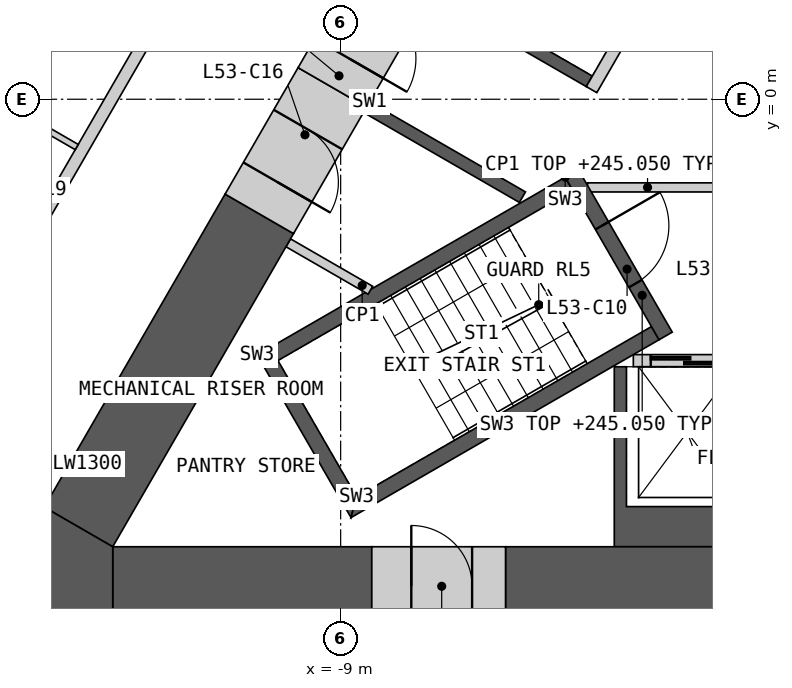
"""IFC4 building model, lengths in metres.
Left out: names, types, materials, properties, quantities, classifications, styles, units other than length and angle.
Written with IfcOpenShell. Run it as: python <this file> out.ifc"""

import sys

from ifc_helpers import new_model, si_unit, direction, frame, frame_2d, origin, place, context, subcontext, project, spatial, polyline, rectangle, outline, extrude, element, fill, save


model = new_model("IFC4")
c1 = context("Model", 3, precision=1e-05, world=origin(), true_north=direction((0.0, 1.0)))
c2 = subcontext(c1, "Body", "Model", "MODEL_VIEW")
j1 = project(units=[si_unit("LENGTHUNIT", "METRE"), si_unit("PLANEANGLEUNIT", "RADIAN")], contexts=[c1])
p1 = place(None, origin())
s1 = spatial("IfcSite", under=j1, at=p1, CompositionType="ELEMENT")
p2 = place(p1, origin())
s2 = spatial("IfcBuilding", under=s1, at=p2, CompositionType="ELEMENT")
p3 = place(p2, frame((0.0, 0.0, 241.8)))
s3 = spatial("IfcBuildingStorey", under=s2, at=p3, CompositionType="ELEMENT", Elevation=241.8)
p4 = place(p3, origin())
e1 = element("IfcWall", 1, at=p4, inside=s3, PredefinedType="SHEAR", context=c2, shape_type="SweptSolid", body=[
    extrude(outline(polyline([(0.1, -7.36), (-4.5, -7.36), (-4.5, -4.4), (-4.3, -4.4), (-4.3, -6.7), (-2.3, -6.7), (-2.3, -4.4), (-2.1, -4.4), (-2.1, -6.7), (-0.1, -6.7), (-0.1, -4.4), (0.1, -4.4), (0.1, -7.36)])), origin(), (0.0, 0.0, 1.0), 3.25),
])
p5 = place(p3, frame((-4.187, -4.3, 0.0), z_axis=(0.0, 0.0, 1.0), x_axis=(1.0, 0.0, 0.0)))
e2 = element("IfcWall", 2, at=p5, inside=s3, PredefinedType="SOLIDWALL", context=c2, shape_type="SweptSolid", body=[
    extrude(rectangle(XDim=8.373, YDim=0.2, at=frame_2d((4.187, 0.0))), origin(), (0.0, 0.0, 1.0), 3.25),
])
p6 = place(p5, frame((0.287, 0.0, 0.0)))
e3 = element("IfcOpeningElement", 3, at=p6, cuts=e2, PredefinedType="OPENING", context=c2, shape_type="SweptSolid", body=[
    extrude(rectangle(XDim=1.2, YDim=2.1, at=frame_2d((0.6, 1.05))), frame((0.0, 0.11, 0.0), z_axis=(0.0, -1.0, 0.0), x_axis=(1.0, 0.0, 0.0)), (0.0, 0.0, 1.0), 0.22),
])
p7 = place(p5, frame((2.387, 0.0, 0.0)))
e4 = element("IfcOpeningElement", 4, at=p7, cuts=e2, PredefinedType="OPENING", context=c2, shape_type="SweptSolid", body=[
    extrude(rectangle(XDim=1.4, YDim=2.1, at=frame_2d((0.7, 1.05))), frame((0.0, 0.11, 0.0), z_axis=(0.0, -1.0, 0.0), x_axis=(1.0, 0.0, 0.0)), (0.0, 0.0, 1.0), 0.22),
])
p8 = place(p5, frame((4.837, 0.0, 0.0)))
e5 = element("IfcOpeningElement", 5, at=p8, cuts=e2, PredefinedType="OPENING", context=c2, shape_type="SweptSolid", body=[
    extrude(rectangle(XDim=0.9, YDim=2.1, at=frame_2d((0.45, 1.05))), frame((0.0, 0.11, 0.0), z_axis=(0.0, -1.0, 0.0), x_axis=(1.0, 0.0, 0.0)), (0.0, 0.0, 1.0), 0.22),
])
p9 = place(p5, frame((6.887, 0.0, 0.0)))
e6 = element("IfcOpeningElement", 6, at=p9, cuts=e2, PredefinedType="OPENING", context=c2, shape_type="SweptSolid", body=[
    extrude(rectangle(XDim=1.2, YDim=2.1, at=frame_2d((0.6, 1.05))), frame((0.0, 0.11, 0.0), z_axis=(0.0, -1.0, 0.0), x_axis=(1.0, 0.0, 0.0)), (0.0, 0.0, 1.0), 0.22),
])
p10 = place(p3, origin())
e7 = element("IfcWall", 7, at=p10, inside=s3, PredefinedType="SHEAR", context=c2, shape_type="SweptSolid", body=[
    extrude(outline(polyline([(-7.524, 1.688), (-4.124, 7.577), (-3.731, 7.35), (-1.561, 6.097), (-1.66, 5.924), (-3.652, 7.074), (-4.652, 5.342), (-2.66, 4.192), (-2.76, 4.019), (-4.752, 5.169), (-5.752, 3.437), (-3.76, 2.287), (-3.861, 2.113), (-5.852, 3.263), (-6.852, 1.531), (-4.861, 0.381), (-4.96, 0.208), (-7.131, 1.461), (-7.524, 1.688)])), origin(), (0.0, 0.0, 1.0), 3.25),
])
p11 = place(p3, origin())
e8 = element("IfcWall", 8, at=p11, inside=s3, PredefinedType="SHEAR", context=c2, shape_type="SweptSolid", body=[
    extrude(outline(polyline([(-8.524, -0.044), (-8.131, -0.271), (-5.96, -1.524), (-6.061, -1.697), (-8.231, -0.444), (-8.624, -0.217), (-8.524, -0.044)])), origin(), (0.0, 0.0, 1.0), 3.25),
])
p12 = place(p3, frame((-1.631, 5.776, 0.0), z_axis=(0.0, 0.0, 1.0), x_axis=(-0.499992876559, -0.866029516466, 0.0)))
e9 = element("IfcWall", 9, at=p12, inside=s3, PredefinedType="SOLIDWALL", context=c2, shape_type="SweptSolid", body=[
    extrude(rectangle(XDim=6.486, YDim=0.2, at=frame_2d((3.243, 0.0))), origin(), (0.0, 0.0, 1.0), 3.25),
])
p13 = place(p12, frame((0.337, 0.0, 0.0)))
e10 = element("IfcOpeningElement", 10, at=p13, cuts=e9, PredefinedType="OPENING", context=c2, shape_type="SweptSolid", body=[
    extrude(rectangle(XDim=1.1, YDim=2.1, at=frame_2d((0.55, 1.05))), frame((0.0, 0.11, 0.0), z_axis=(0.0, -1.0, 0.0), x_axis=(1.0, 0.0, 0.0)), (0.0, 0.0, 1.0), 0.22),
])
p14 = place(p12, frame((2.537, 0.0, 0.0)))
e11 = element("IfcOpeningElement", 11, at=p14, cuts=e9, PredefinedType="OPENING", context=c2, shape_type="SweptSolid", body=[
    extrude(rectangle(XDim=1.1, YDim=2.1, at=frame_2d((0.55, 1.05))), frame((0.0, 0.11, 0.0), z_axis=(0.0, -1.0, 0.0), x_axis=(1.0, 0.0, 0.0)), (0.0, 0.0, 1.0), 0.22),
])
p15 = place(p3, frame((-4.941, -1.45, 0.0), z_axis=(0.0, 0.0, 1.0), x_axis=(1.0, 0.0, 0.0)))
e12 = element("IfcWall", 12, at=p15, inside=s3, PredefinedType="PARTITIONING", context=c2, shape_type="SweptSolid", body=[
    extrude(rectangle(XDim=9.882, YDim=0.15, at=frame_2d((4.941, 0.0))), origin(), (0.0, 0.0, 1.0), 3.25),
])
p16 = place(p15, frame((4.391, 0.0, 0.0)))
e13 = element("IfcOpeningElement", 13, at=p16, cuts=e12, PredefinedType="OPENING", context=c2, shape_type="SweptSolid", body=[
    extrude(rectangle(XDim=1.1, YDim=2.1, at=frame_2d((0.55, 1.05))), frame((0.0, 0.085, 0.0), z_axis=(0.0, -1.0, 0.0), x_axis=(1.0, 0.0, 0.0)), (0.0, 0.0, 1.0), 0.17),
])
p17 = place(p3, origin())
e14 = element("IfcWall", 14, at=p17, inside=s3, PredefinedType="SHEAR", context=c2, shape_type="SweptSolid", body=[
    extrude(outline(polyline([(-5.307, -1.281), (-10.374, -4.206), (-10.032, -4.298), (-5.182, -1.498), (-5.307, -1.281)])), origin(), (0.0, 0.0, 1.0), 3.25),
])
p18 = place(p3, origin())
e15 = element("IfcWall", 15, at=p18, inside=s3, PredefinedType="SHEAR", context=c2, shape_type="SweptSolid", body=[
    extrude(outline(polyline([(-10.374, -4.206), (-8.83, -6.881), (-8.738, -6.539), (-10.032, -4.298), (-10.374, -4.206)])), origin(), (0.0, 0.0, 1.0), 3.25),
])
p19 = place(p3, origin())
e16 = element("IfcWall", 16, at=p19, inside=s3, PredefinedType="SHEAR", context=c2, shape_type="SweptSolid", body=[
    extrude(outline(polyline([(-8.738, -6.539), (-8.83, -6.881), (-3.763, -3.956), (-3.888, -3.739), (-8.738, -6.539)])), origin(), (0.0, 0.0, 1.0), 3.25),
])
p20 = place(p3, frame((-5.199, -1.219, 0.0), z_axis=(0.0, 0.0, 1.0), x_axis=(0.499982516597, -0.866035497597, 0.0)))
e17 = element("IfcWall", 17, at=p20, inside=s3, PredefinedType="SHEAR", context=c2, shape_type="SweptSolid", body=[
    extrude(rectangle(XDim=3.088, YDim=0.25, at=frame_2d((1.544, 0.0))), origin(), (0.0, 0.0, 1.0), 3.25),
])
p21 = place(p20, frame((0.994, 0.0, 0.0)))
e18 = element("IfcOpeningElement", 18, at=p21, cuts=e17, PredefinedType="OPENING", context=c2, shape_type="SweptSolid", body=[
    extrude(rectangle(XDim=1.1, YDim=2.1, at=frame_2d((0.55, 1.05))), frame((0.0, 0.135, 0.0), z_axis=(0.0, -1.0, 0.0), x_axis=(1.0, 0.0, 0.0)), (0.0, 0.0, 1.0), 0.27),
])
p22 = place(p3, frame((-9.862, -2.361, 0.0), z_axis=(0.0, 0.0, 1.0), x_axis=(0.865990094875, -0.500061151839, 0.0)))
e19 = element("IfcWall", 19, at=p22, inside=s3, PredefinedType="PARTITIONING", context=c2, shape_type="SweptSolid", body=[
    extrude(rectangle(XDim=1.56, YDim=0.15, at=frame_2d((0.78, 0.0))), origin(), (0.0, 0.0, 1.0), 3.25),
])
p23 = place(p3, frame((-6.288, -8.01, 0.0), z_axis=(0.0, 0.0, 1.0), x_axis=(1.0, 0.0, 0.0)))
e20 = element("IfcWall", 20, at=p23, inside=s3, PredefinedType="SHEAR", context=c2, shape_type="SweptSolid", body=[
    extrude(rectangle(XDim=12.576, YDim=1.3, at=frame_2d((6.288, 0.0))), origin(), (0.0, 0.0, 1.0), 3.25),
])
p24 = place(p3, frame((-12.748, -8.01, 0.0), z_axis=(0.0, 0.0, 1.0), x_axis=(1.0, 0.0, 0.0)))
e21 = element("IfcWall", 21, at=p24, inside=s3, PredefinedType="SHEAR", context=c2, shape_type="SweptSolid", body=[
    extrude(rectangle(XDim=4.26, YDim=1.3, at=frame_2d((2.13, 0.0))), origin(), (0.0, 0.0, 1.0), 3.25),
])
p25 = place(p3, frame((-10.338, -1.885, 0.0), z_axis=(0.0, 0.0, 1.0), x_axis=(-0.499975944838, -0.866039291593, 0.0)))
e22 = element("IfcWall", 22, at=p25, inside=s3, PredefinedType="SHEAR", context=c2, shape_type="SweptSolid", body=[
    extrude(rectangle(XDim=5.947, YDim=1.3, at=frame_2d((2.974, 0.0))), origin(), (0.0, 0.0, 1.0), 3.25),
])
p26 = place(p3, origin())
e23 = element("IfcWall", 23, at=p26, inside=s3, PredefinedType="SHEAR", context=c2, shape_type="SweptSolid", body=[
    extrude(outline(polyline([(-13.874, -6.71), (-12.748, -7.36), (-12.748, -8.66), (-15.0, -8.66), (-13.874, -6.71)])), origin(), (0.0, 0.0, 1.0), 3.25),
])
p27 = place(p3, frame((-8.488, -8.01, 0.0), z_axis=(0.0, 0.0, 1.0), x_axis=(1.0, 0.0, 0.0)))
e24 = element("IfcWall", 24, at=p27, inside=s3, PredefinedType="SHEAR", context=c2, shape_type="SweptSolid", body=[
    extrude(rectangle(XDim=2.2, YDim=1.3, at=frame_2d((1.1, 0.0))), origin(), (0.0, 0.0, 1.0), 3.25),
])
p28 = place(p27, frame((0.65, 0.0, 0.0)))
e25 = element("IfcOpeningElement", 25, at=p28, cuts=e24, PredefinedType="OPENING", context=c2, shape_type="SweptSolid", body=[
    extrude(rectangle(XDim=1.0, YDim=2.1, at=frame_2d((0.5, 1.05))), frame((0.0, 0.66, 0.0), z_axis=(0.0, -1.0, 0.0), x_axis=(1.0, 0.0, 0.0)), (0.0, 0.0, 1.0), 1.32),
])
p29 = place(p3, frame((-9.137, 0.195, 0.0), z_axis=(0.0, 0.0, 1.0), x_axis=(-0.500009943768, -0.866019662671, 0.0)))
e26 = element("IfcWall", 26, at=p29, inside=s3, PredefinedType="SHEAR", context=c2, shape_type="SweptSolid", body=[
    extrude(rectangle(XDim=2.401, YDim=1.3, at=frame_2d((1.201, 0.0))), origin(), (0.0, 0.0, 1.0), 3.25),
])
p30 = place(p29, frame((0.8, 0.0, 0.0)))
e27 = element("IfcOpeningElement", 27, at=p30, cuts=e26, PredefinedType="OPENING", context=c2, shape_type="SweptSolid", body=[
    extrude(rectangle(XDim=1.0, YDim=2.1, at=frame_2d((0.5, 1.05))), frame((0.0, 0.66, 0.0), z_axis=(0.0, -1.0, 0.0), x_axis=(1.0, 0.0, 0.0)), (0.0, 0.0, 1.0), 1.32),
])
p31 = place(p3, frame((-8.037, 2.1, 0.0), z_axis=(0.0, 0.0, 1.0), x_axis=(-0.50002983664, -0.866008176907, 0.0)))
e28 = element("IfcWall", 28, at=p31, inside=s3, PredefinedType="SHEAR", context=c2, shape_type="SweptSolid", body=[
    extrude(rectangle(XDim=2.2, YDim=1.3, at=frame_2d((1.1, 0.0))), origin(), (0.0, 0.0, 1.0), 3.25),
])
p32 = place(p31, frame((0.55, 0.0, 0.0)))
e29 = element("IfcOpeningElement", 29, at=p32, cuts=e28, PredefinedType="OPENING", context=c2, shape_type="SweptSolid", body=[
    extrude(rectangle(XDim=1.1, YDim=2.1, at=frame_2d((0.55, 1.05))), frame((0.0, 0.66, 0.0), z_axis=(0.0, -1.0, 0.0), x_axis=(1.0, 0.0, 0.0)), (0.0, 0.0, 1.0), 1.32),
])
p33 = place(p3, frame((-14.247, -2.556, 0.0), z_axis=(0.0, 0.0, 1.0), x_axis=(0.49998193945, 0.866035830797, 0.0)))
e30 = element("IfcWall", 30, at=p33, inside=s3, PredefinedType="PARTITIONING", context=c2, shape_type="SweptSolid", body=[
    extrude(rectangle(XDim=9.094, YDim=0.2, at=frame_2d((4.547, 0.0))), origin(), (0.0, 0.0, 1.0), 3.25),
])
p34 = place(p33, frame((6.833, 0.0, 0.0)))
e31 = element("IfcOpeningElement", 31, at=p34, cuts=e30, PredefinedType="OPENING", context=c2, shape_type="SweptSolid", body=[
    extrude(rectangle(XDim=1.1, YDim=2.1, at=frame_2d((0.55, 1.05))), frame((0.0, 0.11, 0.0), z_axis=(0.0, -1.0, 0.0), x_axis=(1.0, 0.0, 0.0)), (0.0, 0.0, 1.0), 0.22),
])
p35 = place(p3, frame((-15.462, 0.439, 0.0), z_axis=(0.0, 0.0, 1.0), x_axis=(0.865989751695, -0.500061746146, 0.0)))
e32 = element("IfcWall", 32, at=p35, inside=s3, PredefinedType="PARTITIONING", context=c2, shape_type="SweptSolid", body=[
    extrude(rectangle(XDim=2.45, YDim=0.1, at=frame_2d((1.225, 0.0))), origin(), (0.0, 0.0, 1.0), 2.404),
])
p36 = place(p6, origin())
e33 = element("IfcDoor", 33, at=p36, inside=s3, OperationType="SLIDING_TO_LEFT", PredefinedType="DOOR", context=c2, shape_type="SweptSolid", body=[
    extrude(rectangle(XDim=1.2, YDim=2.1, at=frame_2d((0.6, 1.05))), frame((0.0, 0.025, 0.0), z_axis=(0.0, -1.0, 0.0), x_axis=(1.0, 0.0, 0.0)), (0.0, 0.0, 1.0), 0.05),
])
fill(e3, e33)
p37 = place(p21, origin())
e34 = element("IfcDoor", 34, at=p37, inside=s3, OperationType="SINGLE_SWING_LEFT", PredefinedType="DOOR", context=c2, shape_type="SweptSolid", body=[
    extrude(rectangle(XDim=1.1, YDim=2.1, at=frame_2d((0.55, 1.05))), frame((0.0, 0.025, 0.0), z_axis=(0.0, -1.0, 0.0), x_axis=(1.0, 0.0, 0.0)), (0.0, 0.0, 1.0), 0.05),
])
fill(e18, e34)
p38 = place(p28, origin())
e35 = element("IfcDoor", 35, at=p38, inside=s3, OperationType="SINGLE_SWING_LEFT", PredefinedType="DOOR", context=c2, shape_type="SweptSolid", body=[
    extrude(rectangle(XDim=1.0, YDim=2.1, at=frame_2d((0.5, 1.05))), frame((0.0, 0.405, 0.0), z_axis=(0.0, -1.0, 0.0), x_axis=(1.0, 0.0, 0.0)), (0.0, 0.0, 1.0), 0.05),
])
fill(e25, e35)
p39 = place(p30, origin())
e36 = element("IfcDoor", 36, at=p39, inside=s3, OperationType="SINGLE_SWING_RIGHT", PredefinedType="DOOR", context=c2, shape_type="SweptSolid", body=[
    extrude(rectangle(XDim=1.0, YDim=2.1, at=frame_2d((0.5, 1.05))), frame((0.0, 0.405, 0.0), z_axis=(0.0, -1.0, 0.0), x_axis=(1.0, 0.0, 0.0)), (0.0, 0.0, 1.0), 0.05),
])
fill(e27, e36)
p40 = place(p32, origin())
e37 = element("IfcDoor", 37, at=p40, inside=s3, OperationType="SINGLE_SWING_RIGHT", PredefinedType="DOOR", context=c2, shape_type="SweptSolid", body=[
    extrude(rectangle(XDim=1.1, YDim=2.1, at=frame_2d((0.55, 1.05))), frame((0.0, 0.405, 0.0), z_axis=(0.0, -1.0, 0.0), x_axis=(1.0, 0.0, 0.0)), (0.0, 0.0, 1.0), 0.05),
])
fill(e29, e37)
save(model, sys.argv[1])
